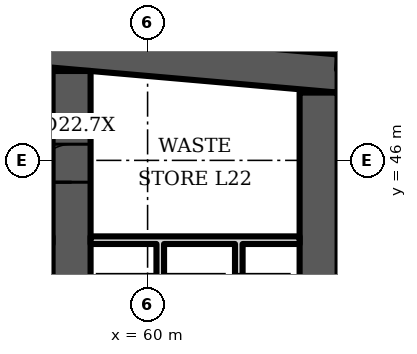
"""IFC4 building model, lengths in metres.
Left out: names, types, materials, properties, quantities, classifications, styles, units other than length and angle.
Written with IfcOpenShell. Run it as: python <this file> out.ifc"""

import sys

from ifc_helpers import new_model, si_unit, direction, frame, frame_2d, origin, place, context, subcontext, project, spatial, polyline, rectangle, outline, extrude, element, fill, save


model = new_model("IFC4")
c1 = context("Model", 3, precision=1e-05, world=origin(), true_north=direction((0.0, 1.0)))
c2 = subcontext(c1, "Body", "Model", "MODEL_VIEW")
j1 = project(units=[si_unit("LENGTHUNIT", "METRE"), si_unit("PLANEANGLEUNIT", "RADIAN")], contexts=[c1])
p1 = place(None, origin())
s1 = spatial("IfcSite", under=j1, at=p1, CompositionType="ELEMENT")
p2 = place(p1, origin())
s2 = spatial("IfcBuilding", under=s1, at=p2, CompositionType="ELEMENT")
p3 = place(p2, frame((0.0, 0.0, 100.3)))
s3 = spatial("IfcBuildingStorey", under=s2, at=p3, CompositionType="ELEMENT", Elevation=100.3)
p4 = place(p3, frame((0.0, 0.0, -0.0)))
e1 = element("IfcWall", 1, at=p4, inside=s3, PredefinedType="SHEAR", context=c2, shape_type="SweptSolid", body=[
    extrude(outline(polyline([(16.0, 47.784), (40.5, 49.927), (65.0, 47.784), (65.0, 48.787), (40.5, 50.931), (16.0, 48.787), (16.0, 47.784)])), origin(), (0.0, 0.0, 1.0), 3.6),
])
p5 = place(p3, frame((58.0, 35.0, 0.0), z_axis=(0.0, 0.0, 1.0), x_axis=(0.0, 1.0, 0.0)))
e2 = element("IfcWall", 2, at=p5, inside=s3, PredefinedType="SHEAR", context=c2, shape_type="SweptSolid", body=[
    extrude(rectangle(XDim=13.352, YDim=1.0, at=frame_2d((6.676, 0.0))), origin(), (0.0, 0.0, 1.0), 3.6),
])
p6 = place(p5, frame((10.426, 0.0, 0.0)))
e3 = element("IfcOpeningElement", 3, at=p6, cuts=e2, PredefinedType="OPENING", context=c2, shape_type="SweptSolid", body=[
    extrude(rectangle(XDim=1.0, YDim=2.1, at=frame_2d((0.5, 1.05))), frame((0.0, 0.51, 0.0), z_axis=(0.0, -1.0, 0.0), x_axis=(1.0, 0.0, 0.0)), (0.0, 0.0, 1.0), 1.02),
])
p7 = place(p5, frame((3.4, 0.0, 0.0)))
e4 = element("IfcOpeningElement", 4, at=p7, cuts=e2, PredefinedType="OPENING", context=c2, shape_type="SweptSolid", body=[
    extrude(rectangle(XDim=1.1, YDim=2.1, at=frame_2d((0.55, 1.05))), frame((0.0, 0.51, 0.0), z_axis=(0.0, -1.0, 0.0), x_axis=(1.0, 0.0, 0.0)), (0.0, 0.0, 1.0), 1.02),
])
p8 = place(p3, frame((64.5, 35.0, 0.0), z_axis=(0.0, 0.0, 1.0), x_axis=(0.0, 1.0, 0.0)))
e5 = element("IfcWall", 5, at=p8, inside=s3, PredefinedType="SHEAR", context=c2, shape_type="SweptSolid", body=[
    extrude(rectangle(XDim=12.784, YDim=1.0, at=frame_2d((6.392, 0.0))), origin(), (0.0, 0.0, 1.0), 3.6),
])
p9 = place(p3, frame((67.983, 48.326, 0.0), z_axis=(0.0, 0.0, 1.0), x_axis=(-0.996194, 0.087168, 0.0)))
e6 = element("IfcWall", 6, at=p9, inside=s3, PredefinedType="SOLIDWALL", context=c2, shape_type="SweptSolid", body=[
    extrude(rectangle(XDim=2.994, YDim=0.4, at=frame_2d((1.497, 0.0))), origin(), (0.0, 0.0, 1.0), 3.2),
])
p10 = place(p3, frame((0.0, 0.0, -0.0)))
e7 = element("IfcWall", 7, at=p10, inside=s3, PredefinedType="PARTITIONING", context=c2, shape_type="SweptSolid", body=[
    extrude(outline(polyline([(60.433, 40.8), (60.233, 40.8), (60.233, 43.8), (58.5, 43.8), (58.5, 44.0), (64.0, 44.0), (64.0, 43.8), (62.5, 43.8), (62.5, 40.8), (62.3, 40.8), (62.3, 43.8), (60.433, 43.8), (60.433, 40.8)])), origin(), (0.0, 0.0, 1.0), 3.2),
])
p11 = place(p6, origin())
e8 = element("IfcDoor", 8, at=p11, inside=s3, OperationType="SINGLE_SWING_LEFT", PredefinedType="DOOR", context=c2, shape_type="SweptSolid", body=[
    extrude(rectangle(XDim=1.0, YDim=2.1, at=frame_2d((0.5, 1.05))), frame((0.0, 0.5, 0.0), z_axis=(0.0, -1.0, 0.0), x_axis=(1.0, 0.0, 0.0)), (0.0, 0.0, 1.0), 1.0),
])
fill(e3, e8)
save(model, sys.argv[1])
